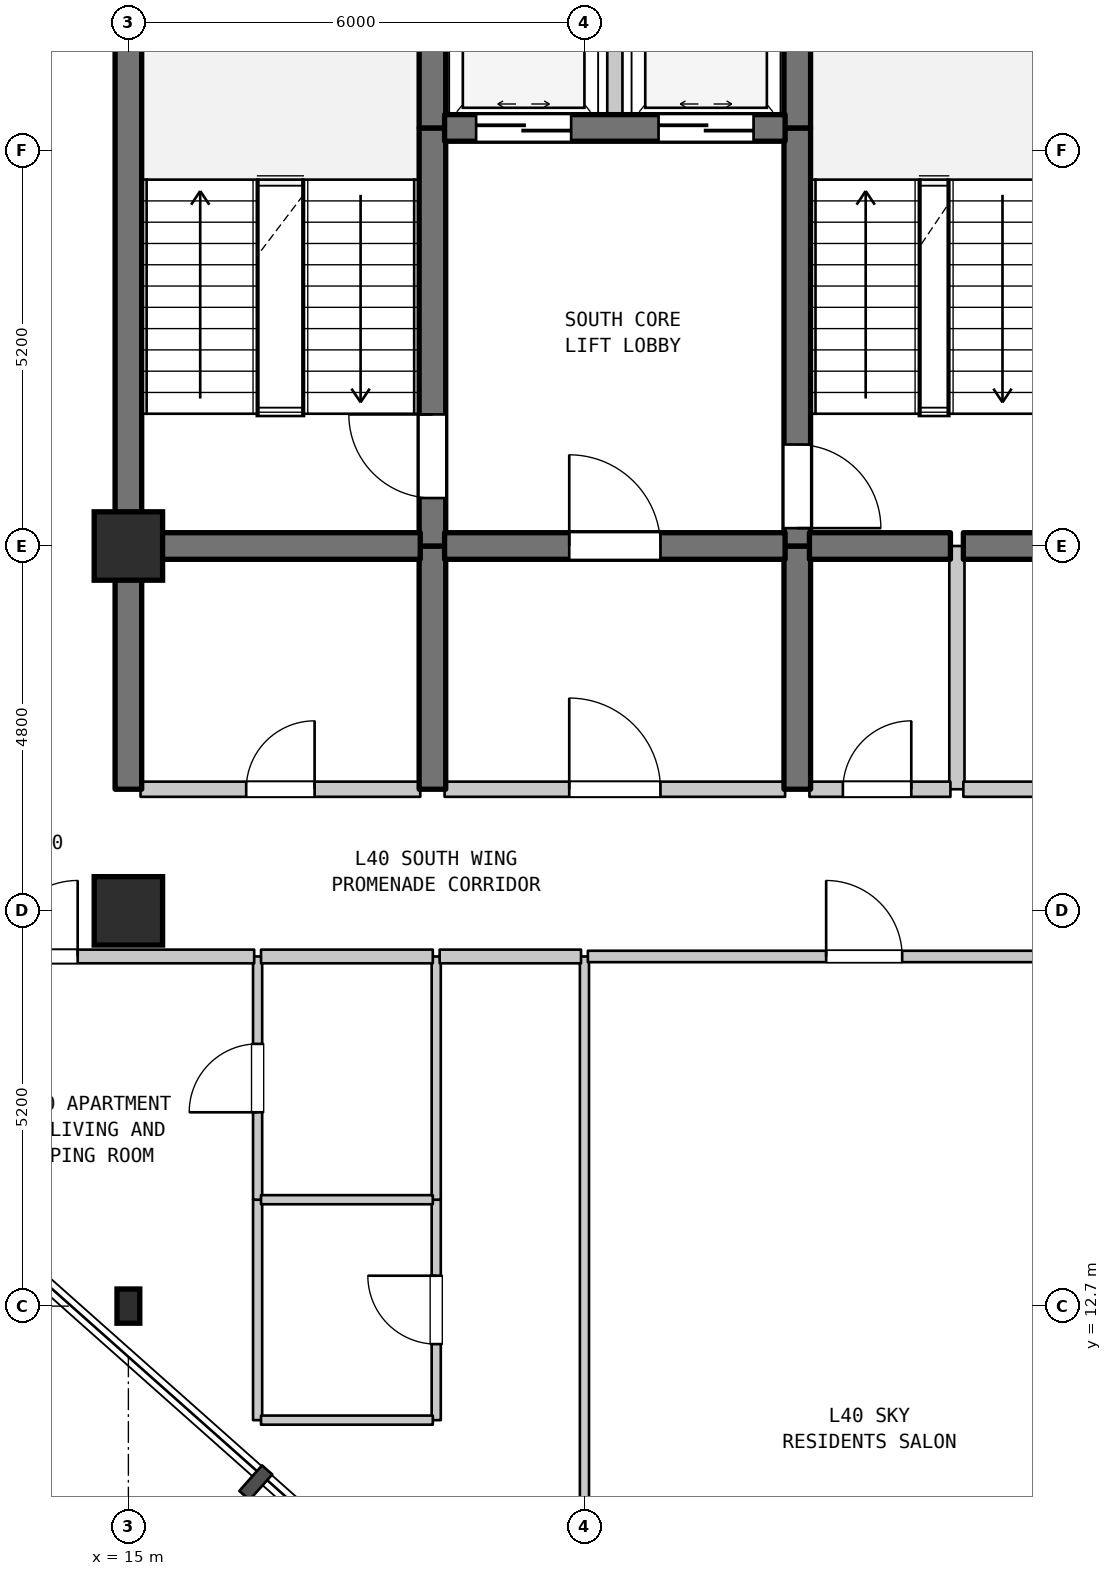
"""IFC4 building model, lengths in metres.
Left out: names, types, materials, properties, quantities, classifications, styles, units other than length and angle.
Written with IfcOpenShell. Run it as: python <this file> out.ifc"""

import sys

from ifc_helpers import new_model, si_unit, direction, frame, frame_2d, origin, origin_2d, place, context, subcontext, project, spatial, rectangle, i_section, extrude, element, fill, save


model = new_model("IFC4")
c1 = context("Model", 3, precision=1e-05, world=origin(), true_north=direction((0.0, 1.0)))
c2 = subcontext(c1, "Body", "Model", "MODEL_VIEW")
j1 = project(units=[si_unit("LENGTHUNIT", "METRE"), si_unit("PLANEANGLEUNIT", "RADIAN")], contexts=[c1])
p1 = place(None, origin())
s1 = spatial("IfcSite", under=j1, at=p1, CompositionType="ELEMENT")
p2 = place(p1, origin())
s2 = spatial("IfcBuilding", under=s1, at=p2, CompositionType="ELEMENT")
p3 = place(p2, frame((0.0, 0.0, 164.6)))
s3 = spatial("IfcBuildingStorey", under=s2, at=p3, CompositionType="ELEMENT", Elevation=164.6)
p4 = place(p3, frame((15.0, 12.7, 0.0), z_axis=(0.0, 0.0, 1.0), x_axis=(1.0, 0.0, 0.0)))
e1 = element("IfcColumn", 1, at=p4, inside=s3, PredefinedType="COLUMN", context=c2, shape_type="SweptSolid", body=[
    extrude(i_section(OverallWidth=0.3, OverallDepth=0.45, WebThickness=0.014, FlangeThickness=0.026, FilletRadius=0.027, at=origin_2d()), origin(), (0.0, 0.0, 1.0), 4.5),
])
for number, where, z_axis, x_axis in (
    (2, (15.0, 17.9, 0.0), (0.0, 0.0, 1.0), (1.0, 0.0, 0.0)),
    (3, (15.0, 22.7, 0.0), (0.0, 0.0, 1.0), (1.0, 0.0, 0.0)),
):
    element("IfcColumn", number, at=place(p3, frame(where, z_axis=z_axis, x_axis=x_axis)), inside=s3, PredefinedType="COLUMN", context=c2, shape_type="SweptSolid", body=[
        extrude(rectangle(XDim=0.9, YDim=0.9, at=origin_2d()), origin(), (0.0, 0.0, 1.0), 4.5),
    ])
p5 = place(p3, frame((15.0, 19.5, 0.0), z_axis=(0.0, 0.0, 1.0), x_axis=(0.0, 1.0, 0.0)))
e4 = element("IfcWall", 4, at=p5, inside=s3, PredefinedType="SHEAR", context=c2, shape_type="SweptSolid", body=[
    extrude(rectangle(XDim=3.2, YDim=0.35, at=frame_2d((1.6, 0.0))), origin(), (0.0, 0.0, 1.0), 4.19),
])
p6 = place(p3, frame((15.0, 22.7, 0.0), z_axis=(0.0, 0.0, 1.0), x_axis=(0.0, 1.0, 0.0)))
e5 = element("IfcWall", 5, at=p6, inside=s3, PredefinedType="SHEAR", context=c2, shape_type="SweptSolid", body=[
    extrude(rectangle(XDim=6.8, YDim=0.35, at=frame_2d((3.4, 0.0))), origin(), (0.0, 0.0, 1.0), 4.19),
])
p7 = place(p3, frame((16.7, 11.2, 0.0), z_axis=(0.0, 0.0, 1.0), x_axis=(0.0, 1.0, 0.0)))
e6 = element("IfcWall", 6, at=p7, inside=s3, PredefinedType="PARTITIONING", context=c2, shape_type="SweptSolid", body=[
    extrude(rectangle(XDim=2.9, YDim=0.12, at=frame_2d((1.45, 0.0))), origin(), (0.0, 0.0, 1.0), 4.19),
])
p8 = place(p3, frame((16.7, 14.1, 0.0), z_axis=(0.0, 0.0, 1.0), x_axis=(0.0, 1.0, 0.0)))
e7 = element("IfcWall", 7, at=p8, inside=s3, PredefinedType="PARTITIONING", context=c2, shape_type="SweptSolid", body=[
    extrude(rectangle(XDim=3.2, YDim=0.12, at=frame_2d((1.6, 0.0))), origin(), (0.0, 0.0, 1.0), 4.19),
])
p9 = place(p8, frame((1.15, 0.0, 0.0)))
e8 = element("IfcOpeningElement", 8, at=p9, cuts=e7, PredefinedType="OPENING", context=c2, shape_type="SweptSolid", body=[
    extrude(rectangle(XDim=0.9, YDim=2.15, at=frame_2d((0.45, 1.075))), frame((0.0, 0.07, 0.0), z_axis=(0.0, -1.0, 0.0), x_axis=(1.0, 0.0, 0.0)), (0.0, 0.0, 1.0), 0.14),
])
p10 = place(p3, frame((19.0, 19.5, 0.0), z_axis=(0.0, 0.0, 1.0), x_axis=(0.0, 1.0, 0.0)))
e9 = element("IfcWall", 9, at=p10, inside=s3, PredefinedType="SHEAR", context=c2, shape_type="SweptSolid", body=[
    extrude(rectangle(XDim=3.2, YDim=0.35, at=frame_2d((1.6, 0.0))), origin(), (0.0, 0.0, 1.0), 4.19),
])
p11 = place(p3, frame((19.0, 22.7, 0.0), z_axis=(0.0, 0.0, 1.0), x_axis=(0.0, 1.0, 0.0)))
e10 = element("IfcWall", 10, at=p11, inside=s3, PredefinedType="SHEAR", context=c2, shape_type="SweptSolid", body=[
    extrude(rectangle(XDim=5.5, YDim=0.35, at=frame_2d((2.75, 0.0))), origin(), (0.0, 0.0, 1.0), 4.19),
])
p12 = place(p11, frame((0.631, 0.0, 0.0)))
e11 = element("IfcOpeningElement", 11, at=p12, cuts=e10, PredefinedType="OPENING", context=c2, shape_type="SweptSolid", body=[
    extrude(rectangle(XDim=1.1, YDim=2.15, at=frame_2d((0.55, 1.075))), frame((0.0, 0.185, 0.0), z_axis=(0.0, -1.0, 0.0), x_axis=(1.0, 0.0, 0.0)), (0.0, 0.0, 1.0), 0.37),
])
p13 = place(p3, frame((19.0, 28.2, 0.0), z_axis=(0.0, 0.0, 1.0), x_axis=(0.0, 1.0, 0.0)))
e12 = element("IfcWall", 12, at=p13, inside=s3, PredefinedType="SHEAR", context=c2, shape_type="SweptSolid", body=[
    extrude(rectangle(XDim=1.3, YDim=0.35, at=frame_2d((0.65, 0.0))), origin(), (0.0, 0.0, 1.0), 4.19),
])
p14 = place(p3, frame((19.05, 11.2, 0.0), z_axis=(0.0, 0.0, 1.0), x_axis=(0.0, 1.0, 0.0)))
e13 = element("IfcWall", 13, at=p14, inside=s3, PredefinedType="PARTITIONING", context=c2, shape_type="SweptSolid", body=[
    extrude(rectangle(XDim=2.9, YDim=0.12, at=frame_2d((1.45, 0.0))), origin(), (0.0, 0.0, 1.0), 4.19),
])
p15 = place(p14, frame((1.0, 0.0, 0.0)))
e14 = element("IfcOpeningElement", 14, at=p15, cuts=e13, PredefinedType="OPENING", context=c2, shape_type="SweptSolid", body=[
    extrude(rectangle(XDim=0.9, YDim=2.1, at=frame_2d((0.45, 1.05))), frame((0.0, 0.07, 0.0), z_axis=(0.0, -1.0, 0.0), x_axis=(1.0, 0.0, 0.0)), (0.0, 0.0, 1.0), 0.14),
])
p16 = place(p3, frame((19.05, 14.1, 0.0), z_axis=(0.0, 0.0, 1.0), x_axis=(0.0, 1.0, 0.0)))
e15 = element("IfcWall", 15, at=p16, inside=s3, PredefinedType="PARTITIONING", context=c2, shape_type="SweptSolid", body=[
    extrude(rectangle(XDim=3.2, YDim=0.12, at=frame_2d((1.6, 0.0))), origin(), (0.0, 0.0, 1.0), 4.19),
])
p17 = place(p3, frame((21.0, 6.71, 0.0), z_axis=(0.0, 0.0, 1.0), x_axis=(0.0, 1.0, 0.0)))
e16 = element("IfcWall", 16, at=p17, inside=s3, PredefinedType="PARTITIONING", context=c2, shape_type="SweptSolid", body=[
    extrude(rectangle(XDim=10.59, YDim=0.12, at=frame_2d((5.295, 0.0))), origin(), (0.0, 0.0, 1.0), 4.19),
])
p18 = place(p3, frame((21.4, 28.2, 0.0), z_axis=(0.0, 0.0, 1.0), x_axis=(0.0, 1.0, 0.0)))
e17 = element("IfcWall", 17, at=p18, inside=s3, PredefinedType="STANDARD", context=c2, shape_type="SweptSolid", body=[
    extrude(rectangle(XDim=2.6, YDim=0.2, at=frame_2d((1.3, 0.0))), origin(), (0.0, 0.0, 1.0), 4.19),
])
p19 = place(p3, frame((23.8, 19.5, 0.0), z_axis=(0.0, 0.0, 1.0), x_axis=(0.0, 1.0, 0.0)))
e18 = element("IfcWall", 18, at=p19, inside=s3, PredefinedType="SHEAR", context=c2, shape_type="SweptSolid", body=[
    extrude(rectangle(XDim=3.2, YDim=0.35, at=frame_2d((1.6, 0.0))), origin(), (0.0, 0.0, 1.0), 4.19),
])
p20 = place(p3, frame((23.8, 22.7, 0.0), z_axis=(0.0, 0.0, 1.0), x_axis=(0.0, 1.0, 0.0)))
e19 = element("IfcWall", 19, at=p20, inside=s3, PredefinedType="SHEAR", context=c2, shape_type="SweptSolid", body=[
    extrude(rectangle(XDim=5.5, YDim=0.35, at=frame_2d((2.75, 0.0))), origin(), (0.0, 0.0, 1.0), 4.19),
])
p21 = place(p20, frame((0.235, 0.0, 0.0)))
e20 = element("IfcOpeningElement", 20, at=p21, cuts=e19, PredefinedType="OPENING", context=c2, shape_type="SweptSolid", body=[
    extrude(rectangle(XDim=1.1, YDim=2.15, at=frame_2d((0.55, 1.075))), frame((0.0, 0.185, 0.0), z_axis=(0.0, -1.0, 0.0), x_axis=(1.0, 0.0, 0.0)), (0.0, 0.0, 1.0), 0.37),
])
p22 = place(p3, frame((23.8, 28.2, 0.0), z_axis=(0.0, 0.0, 1.0), x_axis=(0.0, 1.0, 0.0)))
e21 = element("IfcWall", 21, at=p22, inside=s3, PredefinedType="SHEAR", context=c2, shape_type="SweptSolid", body=[
    extrude(rectangle(XDim=1.3, YDim=0.35, at=frame_2d((0.65, 0.0))), origin(), (0.0, 0.0, 1.0), 4.19),
])
p23 = place(p3, frame((25.9, 19.5, 0.0), z_axis=(0.0, 0.0, 1.0), x_axis=(0.0, 1.0, 0.0)))
e22 = element("IfcWall", 22, at=p23, inside=s3, PredefinedType="STANDARD", context=c2, shape_type="SweptSolid", body=[
    extrude(rectangle(XDim=3.2, YDim=0.2, at=frame_2d((1.6, 0.0))), origin(), (0.0, 0.0, 1.0), 4.19),
])
for number, where, z_axis, x_axis in (
    (23, (16.745, 11.2, 0.0), (0.0, 0.0, 1.0), (1.0, 0.0, 0.0)),
    (24, (16.745, 14.1, 0.0), (0.0, 0.0, 1.0), (1.0, 0.0, 0.0)),
):
    element("IfcWall", number, at=place(p3, frame(where, z_axis=z_axis, x_axis=x_axis)), inside=s3, PredefinedType="PARTITIONING", context=c2, shape_type="SweptSolid", body=[
        extrude(rectangle(XDim=2.26, YDim=0.12, at=frame_2d((1.13, 0.0))), origin(), (0.0, 0.0, 1.0), 4.19),
    ])
p24 = place(p3, frame((12.875, 17.3, 0.0), z_axis=(0.0, 0.0, 1.0), x_axis=(1.0, 0.0, 0.0)))
e25 = element("IfcWall", 25, at=p24, inside=s3, PredefinedType="STANDARD", context=c2, shape_type="SweptSolid", body=[
    extrude(rectangle(XDim=3.78, YDim=0.18, at=frame_2d((1.89, 0.0))), origin(), (0.0, 0.0, 1.0), 4.19),
])
p25 = place(p24, frame((0.458, 0.0, 0.0)))
e26 = element("IfcOpeningElement", 26, at=p25, cuts=e25, PredefinedType="OPENING", context=c2, shape_type="SweptSolid", body=[
    extrude(rectangle(XDim=1.0, YDim=2.15, at=frame_2d((0.5, 1.075))), frame((0.0, 0.1, 0.0), z_axis=(0.0, -1.0, 0.0), x_axis=(1.0, 0.0, 0.0)), (0.0, 0.0, 1.0), 0.2),
])
p26 = place(p3, frame((16.745, 17.3, 0.0), z_axis=(0.0, 0.0, 1.0), x_axis=(1.0, 0.0, 0.0)))
e27 = element("IfcWall", 27, at=p26, inside=s3, PredefinedType="STANDARD", context=c2, shape_type="SweptSolid", body=[
    extrude(rectangle(XDim=2.26, YDim=0.18, at=frame_2d((1.13, 0.0))), origin(), (0.0, 0.0, 1.0), 4.19),
])
p27 = place(p3, frame((19.095, 17.3, 0.0), z_axis=(0.0, 0.0, 1.0), x_axis=(1.0, 0.0, 0.0)))
e28 = element("IfcWall", 28, at=p27, inside=s3, PredefinedType="STANDARD", context=c2, shape_type="SweptSolid", body=[
    extrude(rectangle(XDim=1.86, YDim=0.18, at=frame_2d((0.93, 0.0))), origin(), (0.0, 0.0, 1.0), 4.19),
])
p28 = place(p3, frame((21.045, 17.3, 0.0), z_axis=(0.0, 0.0, 1.0), x_axis=(1.0, 0.0, 0.0)))
e29 = element("IfcWall", 29, at=p28, inside=s3, PredefinedType="STANDARD", context=c2, shape_type="SweptSolid", body=[
    extrude(rectangle(XDim=7.41, YDim=0.15, at=frame_2d((3.705, 0.0))), origin(), (0.0, 0.0, 1.0), 4.19),
])
p29 = place(p28, frame((3.135, 0.0, 0.0)))
e30 = element("IfcOpeningElement", 30, at=p29, cuts=e29, PredefinedType="OPENING", context=c2, shape_type="SweptSolid", body=[
    extrude(rectangle(XDim=1.0, YDim=2.15, at=frame_2d((0.5, 1.075))), frame((0.0, 0.085, 0.0), z_axis=(0.0, -1.0, 0.0), x_axis=(1.0, 0.0, 0.0)), (0.0, 0.0, 1.0), 0.17),
])
p30 = place(p3, frame((15.16, 19.5, 0.0), z_axis=(0.0, 0.0, 1.0), x_axis=(1.0, 0.0, 0.0)))
e31 = element("IfcWall", 31, at=p30, inside=s3, PredefinedType="STANDARD", context=c2, shape_type="SweptSolid", body=[
    extrude(rectangle(XDim=3.68, YDim=0.2, at=frame_2d((1.84, 0.0))), origin(), (0.0, 0.0, 1.0), 4.19),
])
p31 = place(p30, frame((1.39, 0.0, 0.0)))
e32 = element("IfcOpeningElement", 32, at=p31, cuts=e31, PredefinedType="OPENING", context=c2, shape_type="SweptSolid", body=[
    extrude(rectangle(XDim=0.9, YDim=2.15, at=frame_2d((0.45, 1.075))), frame((0.0, 0.11, 0.0), z_axis=(0.0, -1.0, 0.0), x_axis=(1.0, 0.0, 0.0)), (0.0, 0.0, 1.0), 0.22),
])
p32 = place(p3, frame((19.16, 19.5, 0.0), z_axis=(0.0, 0.0, 1.0), x_axis=(1.0, 0.0, 0.0)))
e33 = element("IfcWall", 33, at=p32, inside=s3, PredefinedType="STANDARD", context=c2, shape_type="SweptSolid", body=[
    extrude(rectangle(XDim=4.48, YDim=0.2, at=frame_2d((2.24, 0.0))), origin(), (0.0, 0.0, 1.0), 4.19),
])
p33 = place(p32, frame((1.64, 0.0, 0.0)))
e34 = element("IfcOpeningElement", 34, at=p33, cuts=e33, PredefinedType="OPENING", context=c2, shape_type="SweptSolid", body=[
    extrude(rectangle(XDim=1.2, YDim=2.2, at=frame_2d((0.6, 1.1))), frame((0.0, 0.11, 0.0), z_axis=(0.0, -1.0, 0.0), x_axis=(1.0, 0.0, 0.0)), (0.0, 0.0, 1.0), 0.22),
])
p34 = place(p3, frame((23.96, 19.5, 0.0), z_axis=(0.0, 0.0, 1.0), x_axis=(1.0, 0.0, 0.0)))
e35 = element("IfcWall", 35, at=p34, inside=s3, PredefinedType="STANDARD", context=c2, shape_type="SweptSolid", body=[
    extrude(rectangle(XDim=1.855, YDim=0.2, at=frame_2d((0.927, 0.0))), origin(), (0.0, 0.0, 1.0), 4.19),
])
p35 = place(p34, frame((0.44, 0.0, 0.0)))
e36 = element("IfcOpeningElement", 36, at=p35, cuts=e35, PredefinedType="OPENING", context=c2, shape_type="SweptSolid", body=[
    extrude(rectangle(XDim=0.9, YDim=2.15, at=frame_2d((0.45, 1.075))), frame((0.0, 0.11, 0.0), z_axis=(0.0, -1.0, 0.0), x_axis=(1.0, 0.0, 0.0)), (0.0, 0.0, 1.0), 0.22),
])
p36 = place(p3, frame((25.985, 19.5, 0.0), z_axis=(0.0, 0.0, 1.0), x_axis=(1.0, 0.0, 0.0)))
e37 = element("IfcWall", 37, at=p36, inside=s3, PredefinedType="STANDARD", context=c2, shape_type="SweptSolid", body=[
    extrude(rectangle(XDim=4.655, YDim=0.2, at=frame_2d((2.327, 0.0))), origin(), (0.0, 0.0, 1.0), 4.19),
])
p37 = place(p36, frame((1.845, 0.0, 0.0)))
e38 = element("IfcOpeningElement", 38, at=p37, cuts=e37, PredefinedType="OPENING", context=c2, shape_type="SweptSolid", body=[
    extrude(rectangle(XDim=0.9, YDim=2.15, at=frame_2d((0.45, 1.075))), frame((0.0, 0.11, 0.0), z_axis=(0.0, -1.0, 0.0), x_axis=(1.0, 0.0, 0.0)), (0.0, 0.0, 1.0), 0.22),
])
p38 = place(p3, frame((15.16, 22.7, 0.0), z_axis=(0.0, 0.0, 1.0), x_axis=(1.0, 0.0, 0.0)))
e39 = element("IfcWall", 39, at=p38, inside=s3, PredefinedType="SHEAR", context=c2, shape_type="SweptSolid", body=[
    extrude(rectangle(XDim=3.68, YDim=0.35, at=frame_2d((1.84, 0.0))), origin(), (0.0, 0.0, 1.0), 4.19),
])
p39 = place(p3, frame((19.16, 22.7, 0.0), z_axis=(0.0, 0.0, 1.0), x_axis=(1.0, 0.0, 0.0)))
e40 = element("IfcWall", 40, at=p39, inside=s3, PredefinedType="SHEAR", context=c2, shape_type="SweptSolid", body=[
    extrude(rectangle(XDim=4.48, YDim=0.35, at=frame_2d((2.24, 0.0))), origin(), (0.0, 0.0, 1.0), 4.19),
])
p40 = place(p39, frame((1.64, 0.0, 0.0)))
e41 = element("IfcOpeningElement", 41, at=p40, cuts=e40, PredefinedType="OPENING", context=c2, shape_type="SweptSolid", body=[
    extrude(rectangle(XDim=1.2, YDim=2.2, at=frame_2d((0.6, 1.1))), frame((0.0, 0.185, 0.0), z_axis=(0.0, -1.0, 0.0), x_axis=(1.0, 0.0, 0.0)), (0.0, 0.0, 1.0), 0.37),
])
p41 = place(p3, frame((23.96, 22.7, 0.0), z_axis=(0.0, 0.0, 1.0), x_axis=(1.0, 0.0, 0.0)))
e42 = element("IfcWall", 42, at=p41, inside=s3, PredefinedType="SHEAR", context=c2, shape_type="SweptSolid", body=[
    extrude(rectangle(XDim=1.855, YDim=0.35, at=frame_2d((0.927, 0.0))), origin(), (0.0, 0.0, 1.0), 4.19),
])
p42 = place(p3, frame((25.985, 22.7, 0.0), z_axis=(0.0, 0.0, 1.0), x_axis=(1.0, 0.0, 0.0)))
e43 = element("IfcWall", 43, at=p42, inside=s3, PredefinedType="SHEAR", context=c2, shape_type="SweptSolid", body=[
    extrude(rectangle(XDim=1.155, YDim=0.35, at=frame_2d((0.577, 0.0))), origin(), (0.0, 0.0, 1.0), 4.19),
])
p43 = place(p3, frame((19.16, 28.2, 0.0), z_axis=(0.0, 0.0, 1.0), x_axis=(1.0, 0.0, 0.0)))
e44 = element("IfcWall", 44, at=p43, inside=s3, PredefinedType="SHEAR", context=c2, shape_type="SweptSolid", body=[
    extrude(rectangle(XDim=4.48, YDim=0.35, at=frame_2d((2.24, 0.0))), origin(), (0.0, 0.0, 1.0), 4.19),
])
p44 = place(p43, frame((0.415, 0.0, 0.0)))
e45 = element("IfcOpeningElement", 45, at=p44, cuts=e44, PredefinedType="OPENING", context=c2, shape_type="SweptSolid", body=[
    extrude(rectangle(XDim=1.25, YDim=2.2, at=frame_2d((0.625, 1.1))), frame((0.0, 0.185, 0.0), z_axis=(0.0, -1.0, 0.0), x_axis=(1.0, 0.0, 0.0)), (0.0, 0.0, 1.0), 0.37),
])
p45 = place(p43, frame((2.815, 0.0, 0.0)))
e46 = element("IfcOpeningElement", 46, at=p45, cuts=e44, PredefinedType="OPENING", context=c2, shape_type="SweptSolid", body=[
    extrude(rectangle(XDim=1.25, YDim=2.2, at=frame_2d((0.625, 1.1))), frame((0.0, 0.185, 0.0), z_axis=(0.0, -1.0, 0.0), x_axis=(1.0, 0.0, 0.0)), (0.0, 0.0, 1.0), 0.37),
])
p46 = place(p9, origin())
e47 = element("IfcDoor", 47, at=p46, inside=s3, OperationType="SINGLE_SWING_LEFT", PredefinedType="DOOR", context=c2, shape_type="SweptSolid", body=[
    extrude(rectangle(XDim=0.9, YDim=2.15, at=frame_2d((0.45, 1.075))), frame((0.0, 0.025, 0.0), z_axis=(0.0, -1.0, 0.0), x_axis=(1.0, 0.0, 0.0)), (0.0, 0.0, 1.0), 0.05),
])
fill(e8, e47)
p47 = place(p12, origin())
e48 = element("IfcDoor", 48, at=p47, inside=s3, OperationType="SINGLE_SWING_RIGHT", PredefinedType="DOOR", context=c2, shape_type="SweptSolid", body=[
    extrude(rectangle(XDim=1.1, YDim=2.15, at=frame_2d((0.55, 1.075))), frame((0.0, 0.025, 0.0), z_axis=(0.0, -1.0, 0.0), x_axis=(1.0, 0.0, 0.0)), (0.0, 0.0, 1.0), 0.05),
])
fill(e11, e48)
p48 = place(p15, origin())
e49 = element("IfcDoor", 49, at=p48, inside=s3, OperationType="SINGLE_SWING_RIGHT", PredefinedType="DOOR", context=c2, shape_type="SweptSolid", body=[
    extrude(rectangle(XDim=0.9, YDim=2.1, at=frame_2d((0.45, 1.05))), frame((0.0, 0.025, 0.0), z_axis=(0.0, -1.0, 0.0), x_axis=(1.0, 0.0, 0.0)), (0.0, 0.0, 1.0), 0.05),
])
fill(e14, e49)
p49 = place(p21, frame((1.1, 0.0, 0.0), z_axis=(0.0, 0.0, 1.0), x_axis=(-1.0, 0.0, 0.0)))
e50 = element("IfcDoor", 50, at=p49, inside=s3, OperationType="SINGLE_SWING_LEFT", PredefinedType="DOOR", context=c2, shape_type="SweptSolid", body=[
    extrude(rectangle(XDim=1.1, YDim=2.15, at=frame_2d((0.55, 1.075))), frame((0.0, 0.025, 0.0), z_axis=(0.0, -1.0, 0.0), x_axis=(1.0, 0.0, 0.0)), (0.0, 0.0, 1.0), 0.05),
])
fill(e20, e50)
p50 = place(p25, origin())
e51 = element("IfcDoor", 51, at=p50, inside=s3, OperationType="SINGLE_SWING_RIGHT", PredefinedType="DOOR", context=c2, shape_type="SweptSolid", body=[
    extrude(rectangle(XDim=1.0, YDim=2.15, at=frame_2d((0.5, 1.075))), frame((0.0, 0.025, 0.0), z_axis=(0.0, -1.0, 0.0), x_axis=(1.0, 0.0, 0.0)), (0.0, 0.0, 1.0), 0.05),
])
fill(e26, e51)
p51 = place(p29, origin())
e52 = element("IfcDoor", 52, at=p51, inside=s3, OperationType="SINGLE_SWING_LEFT", PredefinedType="DOOR", context=c2, shape_type="SweptSolid", body=[
    extrude(rectangle(XDim=1.0, YDim=2.15, at=frame_2d((0.5, 1.075))), frame((0.0, 0.025, 0.0), z_axis=(0.0, -1.0, 0.0), x_axis=(1.0, 0.0, 0.0)), (0.0, 0.0, 1.0), 0.05),
])
fill(e30, e52)
p52 = place(p31, origin())
e53 = element("IfcDoor", 53, at=p52, inside=s3, OperationType="SINGLE_SWING_RIGHT", PredefinedType="DOOR", context=c2, shape_type="SweptSolid", body=[
    extrude(rectangle(XDim=0.9, YDim=2.15, at=frame_2d((0.45, 1.075))), frame((0.0, 0.025, 0.0), z_axis=(0.0, -1.0, 0.0), x_axis=(1.0, 0.0, 0.0)), (0.0, 0.0, 1.0), 0.05),
])
fill(e32, e53)
p53 = place(p33, origin())
e54 = element("IfcDoor", 54, at=p53, inside=s3, OperationType="SINGLE_SWING_LEFT", PredefinedType="DOOR", context=c2, shape_type="SweptSolid", body=[
    extrude(rectangle(XDim=1.2, YDim=2.2, at=frame_2d((0.6, 1.1))), frame((0.0, 0.025, 0.0), z_axis=(0.0, -1.0, 0.0), x_axis=(1.0, 0.0, 0.0)), (0.0, 0.0, 1.0), 0.05),
])
fill(e34, e54)
p54 = place(p35, origin())
e55 = element("IfcDoor", 55, at=p54, inside=s3, OperationType="SINGLE_SWING_RIGHT", PredefinedType="DOOR", context=c2, shape_type="SweptSolid", body=[
    extrude(rectangle(XDim=0.9, YDim=2.15, at=frame_2d((0.45, 1.075))), frame((0.0, 0.025, 0.0), z_axis=(0.0, -1.0, 0.0), x_axis=(1.0, 0.0, 0.0)), (0.0, 0.0, 1.0), 0.05),
])
fill(e36, e55)
p55 = place(p40, origin())
e56 = element("IfcDoor", 56, at=p55, inside=s3, OperationType="SINGLE_SWING_LEFT", PredefinedType="DOOR", context=c2, shape_type="SweptSolid", body=[
    extrude(rectangle(XDim=1.2, YDim=2.2, at=frame_2d((0.6, 1.1))), frame((0.0, 0.025, 0.0), z_axis=(0.0, -1.0, 0.0), x_axis=(1.0, 0.0, 0.0)), (0.0, 0.0, 1.0), 0.05),
])
fill(e41, e56)
p56 = place(p44, origin())
e57 = element("IfcDoor", 57, at=p56, inside=s3, OperationType="DOUBLE_DOOR_SLIDING", PredefinedType="DOOR", context=c2, shape_type="SweptSolid", body=[
    extrude(rectangle(XDim=1.25, YDim=2.2, at=frame_2d((0.625, 1.1))), frame((0.0, 0.025, 0.0), z_axis=(0.0, -1.0, 0.0), x_axis=(1.0, 0.0, 0.0)), (0.0, 0.0, 1.0), 0.05),
])
fill(e45, e57)
p57 = place(p45, origin())
e58 = element("IfcDoor", 58, at=p57, inside=s3, OperationType="DOUBLE_DOOR_SLIDING", PredefinedType="DOOR", context=c2, shape_type="SweptSolid", body=[
    extrude(rectangle(XDim=1.25, YDim=2.2, at=frame_2d((0.625, 1.1))), frame((0.0, 0.025, 0.0), z_axis=(0.0, -1.0, 0.0), x_axis=(1.0, 0.0, 0.0)), (0.0, 0.0, 1.0), 0.05),
])
fill(e46, e58)
save(model, sys.argv[1])
